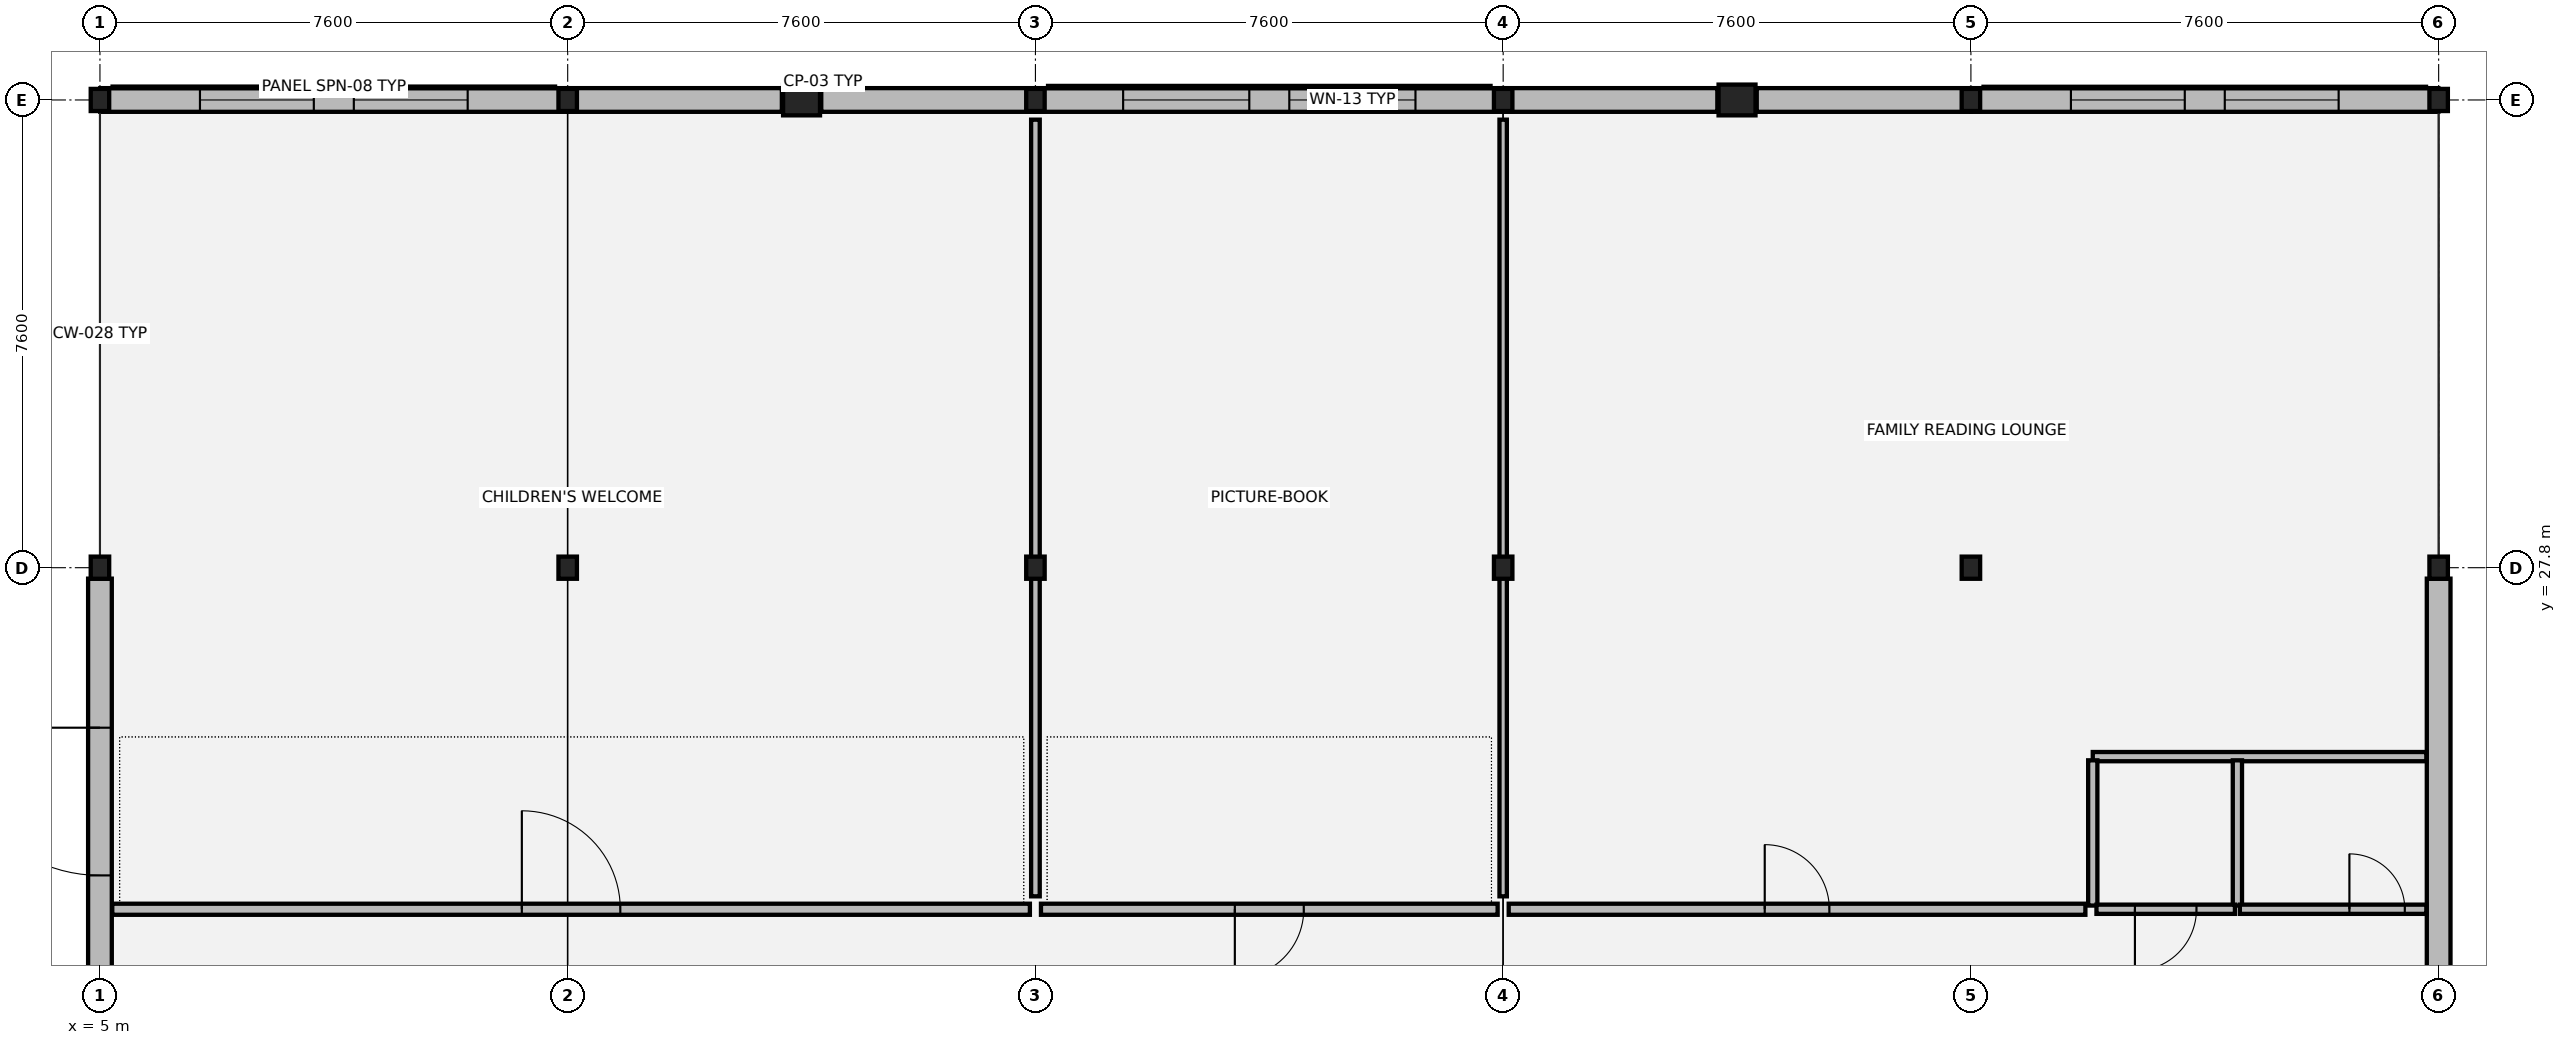
"""IFC4 building model, lengths in metres.
Left out: names, types, materials, properties, quantities, classifications, styles, units other than length and angle.
Written with IfcOpenShell. Run it as: python <this file> out.ifc"""

import sys

from ifc_helpers import new_model, si_unit, direction, frame, frame_2d, origin, origin_2d, place, context, subcontext, project, spatial, rectangle, i_section, extrude, element, fill, save


model = new_model("IFC4")
c1 = context("Model", 3, precision=1e-05, world=origin(), true_north=direction((0.0, 1.0)))
c2 = subcontext(c1, "Body", "Model", "MODEL_VIEW")
j1 = project(units=[si_unit("LENGTHUNIT", "METRE"), si_unit("PLANEANGLEUNIT", "RADIAN")], contexts=[c1])
p1 = place(None, origin())
s1 = spatial("IfcSite", under=j1, at=p1, CompositionType="ELEMENT")
p2 = place(p1, origin())
s2 = spatial("IfcBuilding", under=s1, at=p2, CompositionType="ELEMENT")
p3 = place(p2, origin())
s3 = spatial("IfcBuildingStorey", under=s2, at=p3, CompositionType="ELEMENT", Elevation=0.0)
for number, where, z_axis, x_axis in (
    (1, (5.0, 27.8, 0.0), (0.0, 0.0, 1.0), (1.0, 0.0, 0.0)),
    (2, (5.0, 35.4, 0.0), (0.0, 0.0, 1.0), (1.0, 0.0, 0.0)),
    (3, (12.6, 27.8, 0.0), (0.0, 0.0, 1.0), (1.0, 0.0, 0.0)),
    (4, (12.6, 35.4, 0.0), (0.0, 0.0, 1.0), (1.0, 0.0, 0.0)),
    (5, (20.2, 27.8, 0.0), (0.0, 0.0, 1.0), (1.0, 0.0, 0.0)),
    (6, (20.2, 35.4, 0.0), (0.0, 0.0, 1.0), (1.0, 0.0, 0.0)),
    (7, (27.8, 27.8, 0.0), (0.0, 0.0, 1.0), (1.0, 0.0, 0.0)),
    (8, (27.8, 35.4, 0.0), (0.0, 0.0, 1.0), (1.0, 0.0, 0.0)),
    (9, (35.4, 27.8, 0.0), (0.0, 0.0, 1.0), (1.0, 0.0, 0.0)),
    (10, (35.4, 35.4, 0.0), (0.0, 0.0, 1.0), (1.0, 0.0, 0.0)),
    (11, (43.0, 27.8, 0.0), (0.0, 0.0, 1.0), (1.0, 0.0, 0.0)),
    (12, (43.0, 35.4, 0.0), (0.0, 0.0, 1.0), (1.0, 0.0, 0.0)),
):
    element("IfcColumn", number, at=place(p3, frame(where, z_axis=z_axis, x_axis=x_axis)), inside=s3, PredefinedType="COLUMN", context=c2, shape_type="SweptSolid", body=[
        extrude(i_section(OverallWidth=0.3, OverallDepth=0.36, WebThickness=0.012, FlangeThickness=0.022, at=origin_2d()), origin(), (0.0, 0.0, 1.0), 5.075),
    ])
for number, where, z_axis, x_axis in (
    (13, (16.4, 35.4, 0.0), (0.0, 0.0, 1.0), (1.0, 0.0, 0.0)),
    (14, (31.6, 35.4, 0.0), (0.0, 0.0, 1.0), (1.0, 0.0, 0.0)),
):
    element("IfcColumn", number, at=place(p3, frame(where, z_axis=z_axis, x_axis=x_axis)), inside=s3, PredefinedType="PILASTER", context=c2, shape_type="SweptSolid", body=[
        extrude(rectangle(XDim=0.6, YDim=0.5, at=origin_2d()), origin(), (0.0, 0.0, 1.0), 4.845),
    ])
p4 = place(p3, frame((43.0, 20.378, 0.0), z_axis=(0.0, 0.0, 1.0), x_axis=(0.0, 1.0, 0.0)))
e15 = element("IfcWall", 15, at=p4, inside=s3, PredefinedType="SOLIDWALL", context=c2, shape_type="SweptSolid", body=[
    extrude(rectangle(XDim=7.244, YDim=0.385, at=frame_2d((3.622, 0.0))), origin(), (0.0, 0.0, 1.0), 4.5),
])
p5 = place(p3, frame((42.995, 35.4, 0.0), z_axis=(0.0, 0.0, 1.0), x_axis=(-1.0, 0.0, 0.0)))
e16 = element("IfcWall", 16, at=p5, inside=s3, PredefinedType="SOLIDWALL", context=c2, shape_type="SweptSolid", body=[
    extrude(rectangle(XDim=7.59, YDim=0.385, at=frame_2d((3.795, 0.0))), origin(), (0.0, 0.0, 1.0), 4.5),
])
p6 = place(p5, frame((1.62, 0.0, 0.8)))
e17 = element("IfcOpeningElement", 17, at=p6, cuts=e16, PredefinedType="OPENING", context=c2, shape_type="SweptSolid", body=[
    extrude(rectangle(XDim=1.85, YDim=2.1, at=frame_2d((0.925, 1.05))), frame((0.0, 0.202, 0.0), z_axis=(0.0, -1.0, 0.0), x_axis=(1.0, 0.0, 0.0)), (0.0, 0.0, 1.0), 0.405),
])
p7 = place(p5, frame((4.12, 0.0, 0.8)))
e18 = element("IfcOpeningElement", 18, at=p7, cuts=e16, PredefinedType="OPENING", context=c2, shape_type="SweptSolid", body=[
    extrude(rectangle(XDim=1.85, YDim=2.1, at=frame_2d((0.925, 1.05))), frame((0.0, 0.202, 0.0), z_axis=(0.0, -1.0, 0.0), x_axis=(1.0, 0.0, 0.0)), (0.0, 0.0, 1.0), 0.405),
])
for number, where, z_axis, x_axis in (
    (19, (35.395, 35.4, 0.0), (0.0, 0.0, 1.0), (-1.0, 0.0, 0.0)),
    (20, (31.28, 35.4, 0.0), (0.0, 0.0, 1.0), (-1.0, 0.0, 0.0)),
):
    element("IfcWall", number, at=place(p3, frame(where, z_axis=z_axis, x_axis=x_axis)), inside=s3, PredefinedType="SOLIDWALL", context=c2, shape_type="SweptSolid", body=[
        extrude(rectangle(XDim=3.475, YDim=0.385, at=frame_2d((1.738, 0.0))), origin(), (0.0, 0.0, 1.0), 4.5),
    ])
p8 = place(p3, frame((27.795, 35.4, 0.0), z_axis=(0.0, 0.0, 1.0), x_axis=(-1.0, 0.0, 0.0)))
e21 = element("IfcWall", 21, at=p8, inside=s3, PredefinedType="SOLIDWALL", context=c2, shape_type="SweptSolid", body=[
    extrude(rectangle(XDim=7.59, YDim=0.385, at=frame_2d((3.795, 0.0))), origin(), (0.0, 0.0, 1.0), 4.5),
])
p9 = place(p8, frame((1.42, 0.0, 0.8)))
e22 = element("IfcOpeningElement", 22, at=p9, cuts=e21, PredefinedType="OPENING", context=c2, shape_type="SweptSolid", body=[
    extrude(rectangle(XDim=2.05, YDim=2.18, at=frame_2d((1.025, 1.09))), frame((0.0, 0.202, 0.0), z_axis=(0.0, -1.0, 0.0), x_axis=(1.0, 0.0, 0.0)), (0.0, 0.0, 1.0), 0.405),
])
p10 = place(p8, frame((4.12, 0.0, 0.8)))
e23 = element("IfcOpeningElement", 23, at=p10, cuts=e21, PredefinedType="OPENING", context=c2, shape_type="SweptSolid", body=[
    extrude(rectangle(XDim=2.05, YDim=2.18, at=frame_2d((1.025, 1.09))), frame((0.0, 0.202, 0.0), z_axis=(0.0, -1.0, 0.0), x_axis=(1.0, 0.0, 0.0)), (0.0, 0.0, 1.0), 0.405),
])
for number, where, z_axis, x_axis in (
    (24, (20.195, 35.4, 0.0), (0.0, 0.0, 1.0), (-1.0, 0.0, 0.0)),
    (25, (16.08, 35.4, 0.0), (0.0, 0.0, 1.0), (-1.0, 0.0, 0.0)),
):
    element("IfcWall", number, at=place(p3, frame(where, z_axis=z_axis, x_axis=x_axis)), inside=s3, PredefinedType="SOLIDWALL", context=c2, shape_type="SweptSolid", body=[
        extrude(rectangle(XDim=3.475, YDim=0.385, at=frame_2d((1.738, 0.0))), origin(), (0.0, 0.0, 1.0), 4.5),
    ])
p11 = place(p3, frame((12.595, 35.4, 0.0), z_axis=(0.0, 0.0, 1.0), x_axis=(-1.0, 0.0, 0.0)))
e26 = element("IfcWall", 26, at=p11, inside=s3, PredefinedType="SOLIDWALL", context=c2, shape_type="SweptSolid", body=[
    extrude(rectangle(XDim=7.59, YDim=0.385, at=frame_2d((3.795, 0.0))), origin(), (0.0, 0.0, 1.0), 4.5),
])
p12 = place(p11, frame((1.62, 0.0, 0.8)))
e27 = element("IfcOpeningElement", 27, at=p12, cuts=e26, PredefinedType="OPENING", context=c2, shape_type="SweptSolid", body=[
    extrude(rectangle(XDim=1.85, YDim=2.1, at=frame_2d((0.925, 1.05))), frame((0.0, 0.202, 0.0), z_axis=(0.0, -1.0, 0.0), x_axis=(1.0, 0.0, 0.0)), (0.0, 0.0, 1.0), 0.405),
])
p13 = place(p11, frame((4.12, 0.0, 0.8)))
e28 = element("IfcOpeningElement", 28, at=p13, cuts=e26, PredefinedType="OPENING", context=c2, shape_type="SweptSolid", body=[
    extrude(rectangle(XDim=1.85, YDim=2.1, at=frame_2d((0.925, 1.05))), frame((0.0, 0.202, 0.0), z_axis=(0.0, -1.0, 0.0), x_axis=(1.0, 0.0, 0.0)), (0.0, 0.0, 1.0), 0.405),
])
p14 = place(p3, frame((5.0, 27.622, 0.0), z_axis=(0.0, 0.0, 1.0), x_axis=(0.0, -1.0, 0.0)))
e29 = element("IfcWall", 29, at=p14, inside=s3, PredefinedType="SOLIDWALL", context=c2, shape_type="SweptSolid", body=[
    extrude(rectangle(XDim=7.244, YDim=0.385, at=frame_2d((3.622, 0.0))), origin(), (0.0, 0.0, 1.0), 4.5),
])
p15 = place(p14, frame((2.422, 0.0, 0.0)))
e30 = element("IfcOpeningElement", 30, at=p15, cuts=e29, PredefinedType="OPENING", context=c2, shape_type="SweptSolid", body=[
    extrude(rectangle(XDim=2.4, YDim=2.6, at=frame_2d((1.2, 1.3))), frame((0.0, 0.202, 0.0), z_axis=(0.0, -1.0, 0.0), x_axis=(1.0, 0.0, 0.0)), (0.0, 0.0, 1.0), 0.405),
])
p16 = place(p3, frame((37.38, 24.73, 0.0), z_axis=(0.0, 0.0, 1.0), x_axis=(1.0, 0.0, 0.0)))
e31 = element("IfcWall", 31, at=p16, inside=s3, PredefinedType="PARTITIONING", context=c2, shape_type="SweptSolid", body=[
    extrude(rectangle(XDim=5.42, YDim=0.15, at=frame_2d((2.71, 0.0))), origin(), (0.0, 0.0, 1.0), 4.2),
])
for number, where, z_axis, x_axis in (
    (32, (37.38, 22.31, 0.0), (0.0, 0.0, 1.0), (0.0, 1.0, 0.0)),
    (33, (39.73, 22.31, 0.0), (0.0, 0.0, 1.0), (0.0, 1.0, 0.0)),
):
    element("IfcWall", number, at=place(p3, frame(where, z_axis=z_axis, x_axis=x_axis)), inside=s3, PredefinedType="PARTITIONING", context=c2, shape_type="SweptSolid", body=[
        extrude(rectangle(XDim=2.36, YDim=0.15, at=frame_2d((1.18, 0.0))), origin(), (0.0, 0.0, 1.0), 4.2),
    ])
p17 = place(p3, frame((37.44, 22.25, 0.0), z_axis=(0.0, 0.0, 1.0), x_axis=(1.0, 0.0, 0.0)))
e34 = element("IfcWall", 34, at=p17, inside=s3, PredefinedType="PARTITIONING", context=c2, shape_type="SweptSolid", body=[
    extrude(rectangle(XDim=2.25, YDim=0.15, at=frame_2d((1.125, 0.0))), origin(), (0.0, 0.0, 1.0), 4.2),
])
p18 = place(p17, frame((0.625, 0.0, 0.0)))
e35 = element("IfcOpeningElement", 35, at=p18, cuts=e34, PredefinedType="OPENING", context=c2, shape_type="SweptSolid", body=[
    extrude(rectangle(XDim=1.0, YDim=2.15, at=frame_2d((0.5, 1.075))), frame((0.0, 0.085, 0.0), z_axis=(0.0, -1.0, 0.0), x_axis=(1.0, 0.0, 0.0)), (0.0, 0.0, 1.0), 0.17),
])
p19 = place(p3, frame((39.77, 22.25, 0.0), z_axis=(0.0, 0.0, 1.0), x_axis=(1.0, 0.0, 0.0)))
e36 = element("IfcWall", 36, at=p19, inside=s3, PredefinedType="PARTITIONING", context=c2, shape_type="SweptSolid", body=[
    extrude(rectangle(XDim=3.03, YDim=0.15, at=frame_2d((1.515, 0.0))), origin(), (0.0, 0.0, 1.0), 4.2),
])
p20 = place(p19, frame((1.78, 0.0, 0.0)))
e37 = element("IfcOpeningElement", 37, at=p20, cuts=e36, PredefinedType="OPENING", context=c2, shape_type="SweptSolid", body=[
    extrude(rectangle(XDim=0.9, YDim=2.15, at=frame_2d((0.45, 1.075))), frame((0.0, 0.085, 0.0), z_axis=(0.0, -1.0, 0.0), x_axis=(1.0, 0.0, 0.0)), (0.0, 0.0, 1.0), 0.17),
])
p21 = place(p3, frame((5.2, 22.25, 0.0), z_axis=(0.0, 0.0, 1.0), x_axis=(1.0, 0.0, 0.0)))
e38 = element("IfcWall", 38, at=p21, inside=s3, PredefinedType="PARTITIONING", context=c2, shape_type="SweptSolid", body=[
    extrude(rectangle(XDim=14.91, YDim=0.18, at=frame_2d((7.455, 0.0))), origin(), (0.0, 0.0, 1.0), 4.2),
])
p22 = place(p21, frame((6.655, 0.0, 0.0)))
e39 = element("IfcOpeningElement", 39, at=p22, cuts=e38, PredefinedType="OPENING", context=c2, shape_type="SweptSolid", body=[
    extrude(rectangle(XDim=1.6, YDim=2.25, at=frame_2d((0.8, 1.125))), frame((0.0, 0.1, 0.0), z_axis=(0.0, -1.0, 0.0), x_axis=(1.0, 0.0, 0.0)), (0.0, 0.0, 1.0), 0.2),
])
p23 = place(p3, frame((20.29, 22.25, 0.0), z_axis=(0.0, 0.0, 1.0), x_axis=(1.0, 0.0, 0.0)))
e40 = element("IfcWall", 40, at=p23, inside=s3, PredefinedType="PARTITIONING", context=c2, shape_type="SweptSolid", body=[
    extrude(rectangle(XDim=7.42, YDim=0.18, at=frame_2d((3.71, 0.0))), origin(), (0.0, 0.0, 1.0), 4.2),
])
p24 = place(p23, frame((3.15, 0.0, 0.0)))
e41 = element("IfcOpeningElement", 41, at=p24, cuts=e40, PredefinedType="OPENING", context=c2, shape_type="SweptSolid", body=[
    extrude(rectangle(XDim=1.12, YDim=2.15, at=frame_2d((0.56, 1.075))), frame((0.0, 0.1, 0.0), z_axis=(0.0, -1.0, 0.0), x_axis=(1.0, 0.0, 0.0)), (0.0, 0.0, 1.0), 0.2),
])
p25 = place(p3, frame((27.89, 22.25, 0.0), z_axis=(0.0, 0.0, 1.0), x_axis=(1.0, 0.0, 0.0)))
e42 = element("IfcWall", 42, at=p25, inside=s3, PredefinedType="PARTITIONING", context=c2, shape_type="SweptSolid", body=[
    extrude(rectangle(XDim=9.37, YDim=0.18, at=frame_2d((4.685, 0.0))), origin(), (0.0, 0.0, 1.0), 4.2),
])
p26 = place(p25, frame((4.16, 0.0, 0.0)))
e43 = element("IfcOpeningElement", 43, at=p26, cuts=e42, PredefinedType="OPENING", context=c2, shape_type="SweptSolid", body=[
    extrude(rectangle(XDim=1.05, YDim=2.15, at=frame_2d((0.525, 1.075))), frame((0.0, 0.1, 0.0), z_axis=(0.0, -1.0, 0.0), x_axis=(1.0, 0.0, 0.0)), (0.0, 0.0, 1.0), 0.2),
])
p27 = place(p3, frame((20.2, 22.46, 0.0), z_axis=(0.0, 0.0, 1.0), x_axis=(0.0, 1.0, 0.0)))
e44 = element("IfcWall", 44, at=p27, inside=s3, PredefinedType="PARTITIONING", context=c2, shape_type="SweptSolid", body=[
    extrude(rectangle(XDim=12.62, YDim=0.14, at=frame_2d((6.31, 0.0))), origin(), (0.0, 0.0, 1.0), 4.2),
])
p28 = place(p3, frame((27.8, 22.46, 0.0), z_axis=(0.0, 0.0, 1.0), x_axis=(0.0, 1.0, 0.0)))
e45 = element("IfcWall", 45, at=p28, inside=s3, PredefinedType="PARTITIONING", context=c2, shape_type="SweptSolid", body=[
    extrude(rectangle(XDim=12.62, YDim=0.12, at=frame_2d((6.31, 0.0))), origin(), (0.0, 0.0, 1.0), 4.2),
])
p29 = place(p6, origin())
e46 = element("IfcWindow", 46, at=p29, inside=s3, PartitioningType="SINGLE_PANEL", PredefinedType="WINDOW", context=c2, shape_type="SweptSolid", body=[
    extrude(rectangle(XDim=1.85, YDim=2.1, at=frame_2d((0.925, 1.05))), frame((0.0, 0.03, 0.0), z_axis=(0.0, -1.0, 0.0), x_axis=(1.0, 0.0, 0.0)), (0.0, 0.0, 1.0), 0.06),
])
fill(e17, e46)
p30 = place(p7, origin())
e47 = element("IfcWindow", 47, at=p30, inside=s3, PartitioningType="SINGLE_PANEL", PredefinedType="WINDOW", context=c2, shape_type="SweptSolid", body=[
    extrude(rectangle(XDim=1.85, YDim=2.1, at=frame_2d((0.925, 1.05))), frame((0.0, 0.03, 0.0), z_axis=(0.0, -1.0, 0.0), x_axis=(1.0, 0.0, 0.0)), (0.0, 0.0, 1.0), 0.06),
])
fill(e18, e47)
p31 = place(p9, origin())
e48 = element("IfcWindow", 48, at=p31, inside=s3, PartitioningType="SINGLE_PANEL", PredefinedType="WINDOW", context=c2, shape_type="SweptSolid", body=[
    extrude(rectangle(XDim=2.05, YDim=2.18, at=frame_2d((1.025, 1.09))), frame((0.0, 0.03, 0.0), z_axis=(0.0, -1.0, 0.0), x_axis=(1.0, 0.0, 0.0)), (0.0, 0.0, 1.0), 0.06),
])
fill(e22, e48)
p32 = place(p10, origin())
e49 = element("IfcWindow", 49, at=p32, inside=s3, PartitioningType="SINGLE_PANEL", PredefinedType="WINDOW", context=c2, shape_type="SweptSolid", body=[
    extrude(rectangle(XDim=2.05, YDim=2.18, at=frame_2d((1.025, 1.09))), frame((0.0, 0.03, 0.0), z_axis=(0.0, -1.0, 0.0), x_axis=(1.0, 0.0, 0.0)), (0.0, 0.0, 1.0), 0.06),
])
fill(e23, e49)
p33 = place(p12, origin())
e50 = element("IfcWindow", 50, at=p33, inside=s3, PartitioningType="SINGLE_PANEL", PredefinedType="WINDOW", context=c2, shape_type="SweptSolid", body=[
    extrude(rectangle(XDim=1.85, YDim=2.1, at=frame_2d((0.925, 1.05))), frame((0.0, 0.03, 0.0), z_axis=(0.0, -1.0, 0.0), x_axis=(1.0, 0.0, 0.0)), (0.0, 0.0, 1.0), 0.06),
])
fill(e27, e50)
p34 = place(p13, origin())
e51 = element("IfcWindow", 51, at=p34, inside=s3, PartitioningType="SINGLE_PANEL", PredefinedType="WINDOW", context=c2, shape_type="SweptSolid", body=[
    extrude(rectangle(XDim=1.85, YDim=2.1, at=frame_2d((0.925, 1.05))), frame((0.0, 0.03, 0.0), z_axis=(0.0, -1.0, 0.0), x_axis=(1.0, 0.0, 0.0)), (0.0, 0.0, 1.0), 0.06),
])
fill(e28, e51)
p35 = place(p15, origin())
e52 = element("IfcDoor", 52, at=p35, inside=s3, OperationType="SINGLE_SWING_RIGHT", PredefinedType="DOOR", context=c2, shape_type="SweptSolid", body=[
    extrude(rectangle(XDim=2.4, YDim=2.6, at=frame_2d((1.2, 1.3))), frame((0.0, 0.025, 0.0), z_axis=(0.0, -1.0, 0.0), x_axis=(1.0, 0.0, 0.0)), (0.0, 0.0, 1.0), 0.05),
])
fill(e30, e52)
p36 = place(p18, origin())
e53 = element("IfcDoor", 53, at=p36, inside=s3, OperationType="SINGLE_SWING_RIGHT", PredefinedType="DOOR", context=c2, shape_type="SweptSolid", body=[
    extrude(rectangle(XDim=1.0, YDim=2.15, at=frame_2d((0.5, 1.075))), frame((0.0, 0.025, 0.0), z_axis=(0.0, -1.0, 0.0), x_axis=(1.0, 0.0, 0.0)), (0.0, 0.0, 1.0), 0.05),
])
fill(e35, e53)
p37 = place(p20, origin())
e54 = element("IfcDoor", 54, at=p37, inside=s3, OperationType="SINGLE_SWING_LEFT", PredefinedType="DOOR", context=c2, shape_type="SweptSolid", body=[
    extrude(rectangle(XDim=0.9, YDim=2.15, at=frame_2d((0.45, 1.075))), frame((0.0, 0.025, 0.0), z_axis=(0.0, -1.0, 0.0), x_axis=(1.0, 0.0, 0.0)), (0.0, 0.0, 1.0), 0.05),
])
fill(e37, e54)
p38 = place(p22, origin())
e55 = element("IfcDoor", 55, at=p38, inside=s3, OperationType="DOUBLE_DOOR_SINGLE_SWING", PredefinedType="DOOR", context=c2, shape_type="SweptSolid", body=[
    extrude(rectangle(XDim=1.6, YDim=2.25, at=frame_2d((0.8, 1.125))), frame((0.0, 0.025, 0.0), z_axis=(0.0, -1.0, 0.0), x_axis=(1.0, 0.0, 0.0)), (0.0, 0.0, 1.0), 0.05),
])
fill(e39, e55)
p39 = place(p24, origin())
e56 = element("IfcDoor", 56, at=p39, inside=s3, OperationType="SINGLE_SWING_RIGHT", PredefinedType="DOOR", context=c2, shape_type="SweptSolid", body=[
    extrude(rectangle(XDim=1.12, YDim=2.15, at=frame_2d((0.56, 1.075))), frame((0.0, 0.025, 0.0), z_axis=(0.0, -1.0, 0.0), x_axis=(1.0, 0.0, 0.0)), (0.0, 0.0, 1.0), 0.05),
])
fill(e41, e56)
p40 = place(p26, origin())
e57 = element("IfcDoor", 57, at=p40, inside=s3, OperationType="SINGLE_SWING_LEFT", PredefinedType="DOOR", context=c2, shape_type="SweptSolid", body=[
    extrude(rectangle(XDim=1.05, YDim=2.15, at=frame_2d((0.525, 1.075))), frame((0.0, 0.025, 0.0), z_axis=(0.0, -1.0, 0.0), x_axis=(1.0, 0.0, 0.0)), (0.0, 0.0, 1.0), 0.05),
])
fill(e43, e57)
save(model, sys.argv[1])
